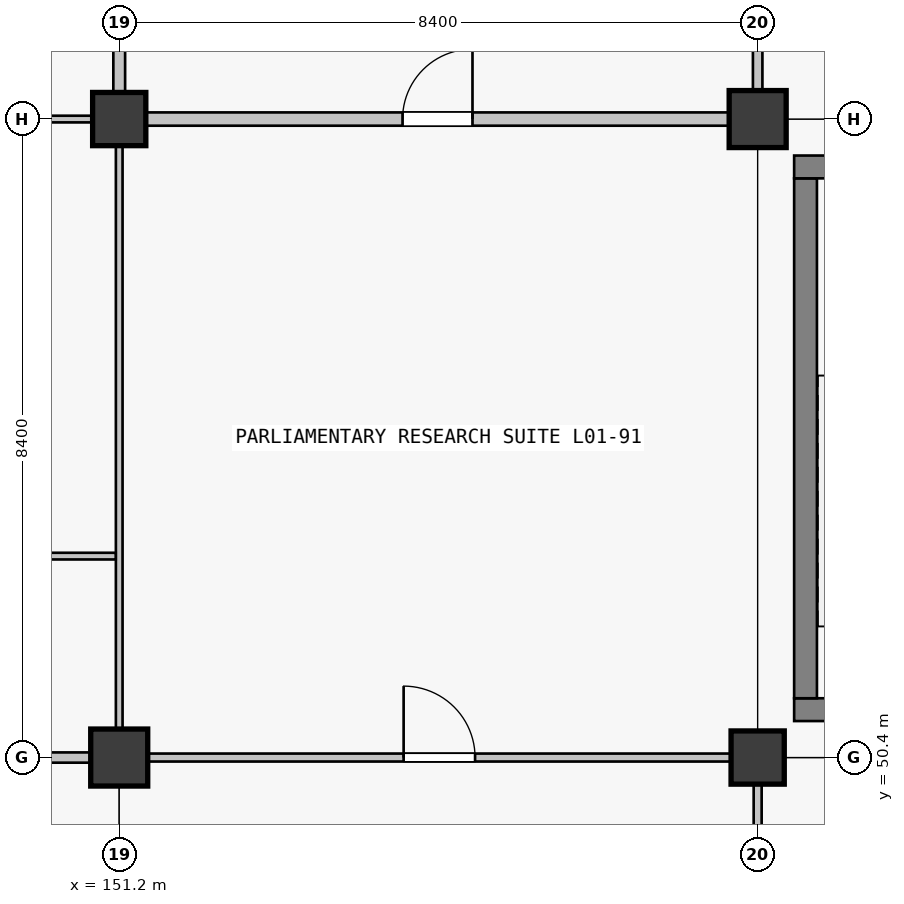
"""IFC4 building model, lengths in metres.
Left out: names, types, materials, properties, quantities, classifications, styles, units other than length and angle.
Written with IfcOpenShell. Run it as: python <this file> out.ifc"""

import sys

from ifc_helpers import new_model, si_unit, direction, frame, frame_2d, origin, origin_2d, place, context, subcontext, project, spatial, rectangle, extrude, element, fill, save


model = new_model("IFC4")
c1 = context("Model", 3, precision=1e-05, world=origin(), true_north=direction((0.0, 1.0)))
c2 = subcontext(c1, "Body", "Model", "MODEL_VIEW")
j1 = project(units=[si_unit("LENGTHUNIT", "METRE"), si_unit("PLANEANGLEUNIT", "RADIAN")], contexts=[c1])
p1 = place(None, origin())
s1 = spatial("IfcSite", under=j1, at=p1, CompositionType="ELEMENT")
p2 = place(p1, origin())
s2 = spatial("IfcBuilding", under=s1, at=p2, CompositionType="ELEMENT")
p3 = place(p2, frame((0.0, 0.0, 5.76)))
s3 = spatial("IfcBuildingStorey", under=s2, at=p3, CompositionType="ELEMENT", Elevation=5.76)
p4 = place(p3, frame((151.2, 50.4, 0.0), z_axis=(0.0, 0.0, 1.0), x_axis=(1.0, 0.0, 0.0)))
e1 = element("IfcColumn", 1, at=p4, inside=s3, PredefinedType="COLUMN", context=c2, shape_type="SweptSolid", body=[
    extrude(rectangle(XDim=0.75, YDim=0.75, at=origin_2d()), origin(), (0.0, 0.0, 1.0), 4.5),
])
for number, where, z_axis, x_axis in (
    (2, (151.2, 58.8, 0.0), (0.0, 0.0, 1.0), (1.0, 0.0, 0.0)),
    (3, (159.6, 50.4, 0.0), (0.0, 0.0, 1.0), (1.0, 0.0, 0.0)),
):
    element("IfcColumn", number, at=place(p3, frame(where, z_axis=z_axis, x_axis=x_axis)), inside=s3, PredefinedType="COLUMN", context=c2, shape_type="SweptSolid", body=[
        extrude(rectangle(XDim=0.7, YDim=0.7, at=origin_2d()), origin(), (0.0, 0.0, 1.0), 4.5),
    ])
p5 = place(p3, frame((159.6, 58.8, 0.0), z_axis=(0.0, 0.0, 1.0), x_axis=(1.0, 0.0, 0.0)))
e4 = element("IfcColumn", 4, at=p5, inside=s3, PredefinedType="COLUMN", context=c2, shape_type="SweptSolid", body=[
    extrude(rectangle(XDim=0.75, YDim=0.75, at=origin_2d()), origin(), (0.0, 0.0, 1.0), 4.5),
])
p6 = place(p3, frame((167.52, 51.03, 0.0), z_axis=(0.0, 0.0, 1.0), x_axis=(-1.0, 0.0, 0.0)))
e5 = element("IfcWall", 5, at=p6, inside=s3, PredefinedType="SHEAR", context=c2, shape_type="SweptSolid", body=[
    extrude(rectangle(XDim=7.44, YDim=0.3, at=frame_2d((3.72, 0.0))), origin(), (0.0, 0.0, 1.0), 4.5),
])
p7 = place(p6, frame((1.28, 0.0, 0.0)))
e6 = element("IfcOpeningElement", 6, at=p7, cuts=e5, PredefinedType="OPENING", context=c2, shape_type="SweptSolid", body=[
    extrude(rectangle(XDim=1.5, YDim=2.15, at=frame_2d((0.75, 1.075))), frame((0.0, 0.15, 0.0), z_axis=(0.0, -1.0, 0.0), x_axis=(1.0, 0.0, 0.0)), (0.0, 0.0, 1.0), 0.3),
])
p8 = place(p3, frame((160.23, 51.18, 0.0), z_axis=(0.0, 0.0, 1.0), x_axis=(0.0, 1.0, 0.0)))
e7 = element("IfcWall", 7, at=p8, inside=s3, PredefinedType="SHEAR", context=c2, shape_type="SweptSolid", body=[
    extrude(rectangle(XDim=6.84, YDim=0.3, at=frame_2d((3.42, 0.0))), origin(), (0.0, 0.0, 1.0), 4.5),
])
p9 = place(p3, frame((160.08, 58.17, 0.0), z_axis=(0.0, 0.0, 1.0), x_axis=(1.0, 0.0, 0.0)))
e8 = element("IfcWall", 8, at=p9, inside=s3, PredefinedType="SHEAR", context=c2, shape_type="SweptSolid", body=[
    extrude(rectangle(XDim=7.44, YDim=0.3, at=frame_2d((3.72, 0.0))), origin(), (0.0, 0.0, 1.0), 4.5),
])
p10 = place(p3, frame((143.152, 50.4, 0.0), z_axis=(0.0, 0.0, 1.0), x_axis=(1.0, 0.0, 0.0)))
e9 = element("IfcWall", 9, at=p10, inside=s3, PredefinedType="PARTITIONING", context=c2, shape_type="SweptSolid", body=[
    extrude(rectangle(XDim=7.671, YDim=0.135, at=frame_2d((3.835, 0.0))), origin(), (0.0, 0.0, 1.0), 2.4),
])
p11 = place(p3, frame((143.177, 58.8, 0.0), z_axis=(0.0, 0.0, 1.0), x_axis=(1.0, 0.0, 0.0)))
e10 = element("IfcWall", 10, at=p11, inside=s3, PredefinedType="PARTITIONING", context=c2, shape_type="SweptSolid", body=[
    extrude(rectangle(XDim=7.671, YDim=0.088, at=frame_2d((3.835, 0.0))), origin(), (0.0, 0.0, 1.0), 2.4),
])
p12 = place(p3, frame((151.577, 50.4, 0.0), z_axis=(0.0, 0.0, 1.0), x_axis=(1.0, 0.0, 0.0)))
e11 = element("IfcWall", 11, at=p12, inside=s3, PredefinedType="PARTITIONING", context=c2, shape_type="SweptSolid", body=[
    extrude(rectangle(XDim=7.671, YDim=0.105, at=frame_2d((3.835, 0.0))), origin(), (0.0, 0.0, 1.0), 2.4),
])
p13 = place(p12, frame((3.365, 0.0, 0.0)))
e12 = element("IfcOpeningElement", 12, at=p13, cuts=e11, PredefinedType="OPENING", context=c2, shape_type="SweptSolid", body=[
    extrude(rectangle(XDim=0.94, YDim=2.15, at=frame_2d((0.47, 1.075))), frame((0.0, 0.052, 0.0), z_axis=(0.0, -1.0, 0.0), x_axis=(1.0, 0.0, 0.0)), (0.0, 0.0, 1.0), 0.105),
])
p14 = place(p3, frame((151.552, 58.8, 0.0), z_axis=(0.0, 0.0, 1.0), x_axis=(1.0, 0.0, 0.0)))
e13 = element("IfcWall", 13, at=p14, inside=s3, PredefinedType="PARTITIONING", context=c2, shape_type="SweptSolid", body=[
    extrude(rectangle(XDim=7.671, YDim=0.175, at=frame_2d((3.835, 0.0))), origin(), (0.0, 0.0, 1.0), 2.4),
])
p15 = place(p14, frame((3.376, 0.0, 0.0)))
e14 = element("IfcOpeningElement", 14, at=p15, cuts=e13, PredefinedType="OPENING", context=c2, shape_type="SweptSolid", body=[
    extrude(rectangle(XDim=0.92, YDim=2.15, at=frame_2d((0.46, 1.075))), frame((0.0, 0.087, 0.0), z_axis=(0.0, -1.0, 0.0), x_axis=(1.0, 0.0, 0.0)), (0.0, 0.0, 1.0), 0.175),
])
p16 = place(p3, frame((151.2, 50.777, 0.0), z_axis=(0.0, 0.0, 1.0), x_axis=(0.0, 1.0, 0.0)))
e15 = element("IfcWall", 15, at=p16, inside=s3, PredefinedType="PARTITIONING", context=c2, shape_type="SweptSolid", body=[
    extrude(rectangle(XDim=7.671, YDim=0.088, at=frame_2d((3.835, 0.0))), origin(), (0.0, 0.0, 1.0), 2.4),
])
p17 = place(p3, frame((151.2, 59.152, 0.0), z_axis=(0.0, 0.0, 1.0), x_axis=(0.0, 1.0, 0.0)))
e16 = element("IfcWall", 16, at=p17, inside=s3, PredefinedType="PARTITIONING", context=c2, shape_type="SweptSolid", body=[
    extrude(rectangle(XDim=7.671, YDim=0.155, at=frame_2d((3.835, 0.0))), origin(), (0.0, 0.0, 1.0), 2.4),
])
p18 = place(p17, frame((3.331, 0.0, 0.0)))
e17 = element("IfcOpeningElement", 17, at=p18, cuts=e16, PredefinedType="OPENING", context=c2, shape_type="SweptSolid", body=[
    extrude(rectangle(XDim=1.01, YDim=2.12, at=frame_2d((0.505, 1.06))), frame((0.0, 0.078, 0.0), z_axis=(0.0, -1.0, 0.0), x_axis=(1.0, 0.0, 0.0)), (0.0, 0.0, 1.0), 0.155),
])
p19 = place(p3, frame((159.6, 42.377, 0.0), z_axis=(0.0, 0.0, 1.0), x_axis=(0.0, 1.0, 0.0)))
e18 = element("IfcWall", 18, at=p19, inside=s3, PredefinedType="PARTITIONING", context=c2, shape_type="SweptSolid", body=[
    extrude(rectangle(XDim=7.671, YDim=0.105, at=frame_2d((3.835, 0.0))), origin(), (0.0, 0.0, 1.0), 2.4),
])
p20 = place(p19, frame((3.311, 0.0, 0.0)))
e19 = element("IfcOpeningElement", 19, at=p20, cuts=e18, PredefinedType="OPENING", context=c2, shape_type="SweptSolid", body=[
    extrude(rectangle(XDim=1.05, YDim=2.12, at=frame_2d((0.525, 1.06))), frame((0.0, 0.052, 0.0), z_axis=(0.0, -1.0, 0.0), x_axis=(1.0, 0.0, 0.0)), (0.0, 0.0, 1.0), 0.105),
])
p21 = place(p3, frame((159.6, 59.177, 0.0), z_axis=(0.0, 0.0, 1.0), x_axis=(0.0, 1.0, 0.0)))
e20 = element("IfcWall", 20, at=p21, inside=s3, PredefinedType="PARTITIONING", context=c2, shape_type="SweptSolid", body=[
    extrude(rectangle(XDim=7.671, YDim=0.125, at=frame_2d((3.835, 0.0))), origin(), (0.0, 0.0, 1.0), 2.4),
])
p22 = place(p21, frame((3.331, 0.0, 0.0)))
e21 = element("IfcOpeningElement", 21, at=p22, cuts=e20, PredefinedType="OPENING", context=c2, shape_type="SweptSolid", body=[
    extrude(rectangle(XDim=1.01, YDim=2.12, at=frame_2d((0.505, 1.06))), frame((0.0, 0.062, 0.0), z_axis=(0.0, -1.0, 0.0), x_axis=(1.0, 0.0, 0.0)), (0.0, 0.0, 1.0), 0.125),
])
p23 = place(p3, frame((142.86, 53.05, 0.0), z_axis=(0.0, 0.0, 1.0), x_axis=(1.0, 0.0, 0.0)))
e22 = element("IfcWall", 22, at=p23, inside=s3, PredefinedType="PARTITIONING", context=c2, shape_type="SweptSolid", body=[
    extrude(rectangle(XDim=8.294, YDim=0.088, at=frame_2d((4.147, 0.0))), origin(), (0.0, 0.0, 1.0), 2.4),
])
p24 = place(p13, origin())
e23 = element("IfcDoor", 23, at=p24, inside=s3, OperationType="SINGLE_SWING_LEFT", PredefinedType="DOOR", context=c2, shape_type="SweptSolid", body=[
    extrude(rectangle(XDim=0.94, YDim=2.15, at=frame_2d((0.47, 1.075))), frame((0.0, 0.025, 0.0), z_axis=(0.0, -1.0, 0.0), x_axis=(1.0, 0.0, 0.0)), (0.0, 0.0, 1.0), 0.05),
])
fill(e12, e23)
p25 = place(p15, origin())
e24 = element("IfcDoor", 24, at=p25, inside=s3, OperationType="SINGLE_SWING_RIGHT", PredefinedType="DOOR", context=c2, shape_type="SweptSolid", body=[
    extrude(rectangle(XDim=0.92, YDim=2.15, at=frame_2d((0.46, 1.075))), frame((0.0, 0.025, 0.0), z_axis=(0.0, -1.0, 0.0), x_axis=(1.0, 0.0, 0.0)), (0.0, 0.0, 1.0), 0.05),
])
fill(e14, e24)
save(model, sys.argv[1])
